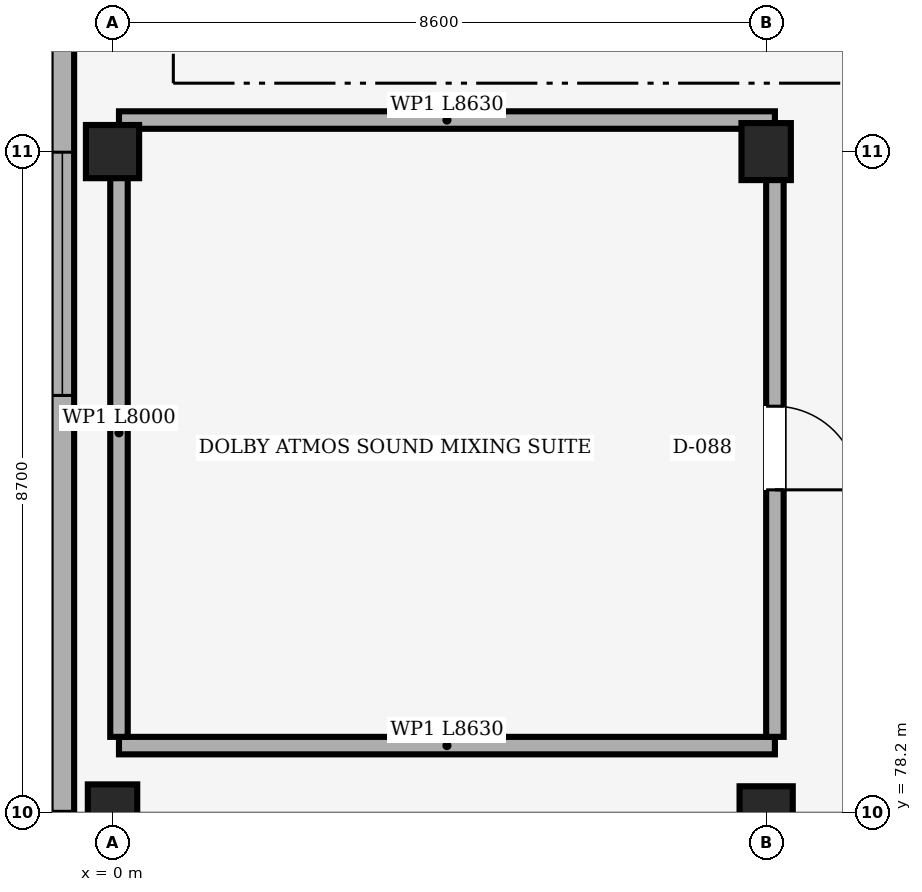
"""IFC4 building model, lengths in metres.
Left out: names, types, materials, properties, quantities, classifications, styles, units other than length and angle.
Written with IfcOpenShell. Run it as: python <this file> out.ifc"""

import sys

from ifc_helpers import new_model, si_unit, direction, frame, frame_2d, origin, origin_2d, place, context, subcontext, project, spatial, rectangle, extrude, element, fill, save


model = new_model("IFC4")
c1 = context("Model", 3, precision=1e-05, world=origin(), true_north=direction((0.0, 1.0)))
c2 = subcontext(c1, "Body", "Model", "MODEL_VIEW")
j1 = project(units=[si_unit("LENGTHUNIT", "METRE"), si_unit("PLANEANGLEUNIT", "RADIAN")], contexts=[c1])
p1 = place(None, origin())
s1 = spatial("IfcSite", under=j1, at=p1, CompositionType="ELEMENT")
p2 = place(p1, origin())
s2 = spatial("IfcBuilding", under=s1, at=p2, CompositionType="ELEMENT")
p3 = place(p2, frame((0.0, 0.0, 8.4)))
s3 = spatial("IfcBuildingStorey", under=s2, at=p3, CompositionType="ELEMENT", Elevation=8.4)
p4 = place(p3, frame((0.0, 78.2, 0.0), z_axis=(0.0, 0.0, 1.0), x_axis=(1.0, 0.0, 0.0)))
e1 = element("IfcColumn", 1, at=p4, inside=s3, PredefinedType="COLUMN", context=c2, shape_type="SweptSolid", body=[
    extrude(rectangle(XDim=0.65, YDim=0.75, at=origin_2d()), origin(), (0.0, 0.0, 1.0), 3.34),
])
for number, where, z_axis, x_axis in (
    (2, (0.0, 86.9, 0.0), (0.0, 0.0, 1.0), (1.0, 0.0, 0.0)),
    (3, (8.6, 78.2, 0.0), (0.0, 0.0, 1.0), (1.0, 0.0, 0.0)),
):
    element("IfcColumn", number, at=place(p3, frame(where, z_axis=z_axis, x_axis=x_axis)), inside=s3, PredefinedType="COLUMN", context=c2, shape_type="SweptSolid", body=[
        extrude(rectangle(XDim=0.7, YDim=0.7, at=origin_2d()), origin(), (0.0, 0.0, 1.0), 3.34),
    ])
p5 = place(p3, frame((8.6, 86.9, 0.0), z_axis=(0.0, 0.0, 1.0), x_axis=(1.0, 0.0, 0.0)))
e4 = element("IfcColumn", 4, at=p5, inside=s3, PredefinedType="COLUMN", context=c2, shape_type="SweptSolid", body=[
    extrude(rectangle(XDim=0.65, YDim=0.75, at=origin_2d()), origin(), (0.0, 0.0, 1.0), 3.34),
])
p6 = place(p3, frame((-0.66, 113.66, 0.0), z_axis=(0.0, 0.0, 1.0), x_axis=(0.0, -1.0, 0.0)))
e5 = element("IfcWall", 5, at=p6, inside=s3, PredefinedType="SOLIDWALL", context=c2, shape_type="SweptSolid", body=[
    extrude(rectangle(XDim=35.46, YDim=0.31, at=frame_2d((17.73, 0.0))), origin(), (0.0, 0.0, 1.0), 3.34),
])
p7 = place(p6, frame((5.492, 0.0, 1.55)))
e6 = element("IfcOpeningElement", 6, at=p7, cuts=e5, PredefinedType="OPENING", context=c2, shape_type="SweptSolid", body=[
    extrude(rectangle(XDim=3.2, YDim=0.7, at=frame_2d((1.6, 0.35))), frame((0.0, 0.155, 0.0), z_axis=(0.0, -1.0, 0.0), x_axis=(1.0, 0.0, 0.0)), (0.0, 0.0, 1.0), 0.31),
])
p8 = place(p6, frame((12.584, 0.0, 1.55)))
e7 = element("IfcOpeningElement", 7, at=p8, cuts=e5, PredefinedType="OPENING", context=c2, shape_type="SweptSolid", body=[
    extrude(rectangle(XDim=3.2, YDim=0.7, at=frame_2d((1.6, 0.35))), frame((0.0, 0.155, 0.0), z_axis=(0.0, -1.0, 0.0), x_axis=(1.0, 0.0, 0.0)), (0.0, 0.0, 1.0), 0.31),
])
p9 = place(p6, frame((19.676, 0.0, 1.55)))
e8 = element("IfcOpeningElement", 8, at=p9, cuts=e5, PredefinedType="OPENING", context=c2, shape_type="SweptSolid", body=[
    extrude(rectangle(XDim=3.2, YDim=0.7, at=frame_2d((1.6, 0.35))), frame((0.0, 0.155, 0.0), z_axis=(0.0, -1.0, 0.0), x_axis=(1.0, 0.0, 0.0)), (0.0, 0.0, 1.0), 0.31),
])
p10 = place(p6, frame((26.768, 0.0, 1.55)))
e9 = element("IfcOpeningElement", 9, at=p10, cuts=e5, PredefinedType="OPENING", context=c2, shape_type="SweptSolid", body=[
    extrude(rectangle(XDim=3.2, YDim=0.7, at=frame_2d((1.6, 0.35))), frame((0.0, 0.155, 0.0), z_axis=(0.0, -1.0, 0.0), x_axis=(1.0, 0.0, 0.0)), (0.0, 0.0, 1.0), 0.31),
])
p11 = place(p3, frame((8.715, 79.085, 0.0), z_axis=(0.0, 0.0, 1.0), x_axis=(-1.0, 0.0, 0.0)))
e10 = element("IfcWall", 10, at=p11, inside=s3, PredefinedType="PARTITIONING", context=c2, shape_type="SweptSolid", body=[
    extrude(rectangle(XDim=8.63, YDim=0.23, at=frame_2d((4.315, 0.0))), origin(), (0.0, 0.0, 1.0), 3.32),
])
p12 = place(p3, frame((0.085, 79.2, 0.0), z_axis=(0.0, 0.0, 1.0), x_axis=(0.0, 1.0, 0.0)))
e11 = element("IfcWall", 11, at=p12, inside=s3, PredefinedType="PARTITIONING", context=c2, shape_type="SweptSolid", body=[
    extrude(rectangle(XDim=8.0, YDim=0.23, at=frame_2d((4.0, 0.0))), origin(), (0.0, 0.0, 1.0), 2.67),
])
p13 = place(p3, frame((0.085, 87.315, 0.0), z_axis=(0.0, 0.0, 1.0), x_axis=(1.0, 0.0, 0.0)))
e12 = element("IfcWall", 12, at=p13, inside=s3, PredefinedType="PARTITIONING", context=c2, shape_type="SweptSolid", body=[
    extrude(rectangle(XDim=8.63, YDim=0.23, at=frame_2d((4.315, 0.0))), origin(), (0.0, 0.0, 1.0), 2.62),
])
p14 = place(p3, frame((8.715, 87.2, 0.0), z_axis=(0.0, 0.0, 1.0), x_axis=(0.0, -1.0, 0.0)))
e13 = element("IfcWall", 13, at=p14, inside=s3, PredefinedType="PARTITIONING", context=c2, shape_type="SweptSolid", body=[
    extrude(rectangle(XDim=8.0, YDim=0.23, at=frame_2d((4.0, 0.0))), origin(), (0.0, 0.0, 1.0), 2.62),
])
p15 = place(p14, frame((3.65, 0.0, 0.0)))
e14 = element("IfcOpeningElement", 14, at=p15, cuts=e13, PredefinedType="OPENING", context=c2, shape_type="SweptSolid", body=[
    extrude(rectangle(XDim=1.1, YDim=2.1, at=frame_2d((0.55, 1.05))), frame((0.0, 0.115, 0.0), z_axis=(0.0, -1.0, 0.0), x_axis=(1.0, 0.0, 0.0)), (0.0, 0.0, 1.0), 0.23),
])
p16 = place(p10, origin())
e15 = element("IfcWindow", 15, at=p16, inside=s3, PartitioningType="SINGLE_PANEL", PredefinedType="WINDOW", context=c2, shape_type="SweptSolid", body=[
    extrude(rectangle(XDim=3.2, YDim=0.7, at=frame_2d((1.6, 0.35))), frame((0.0, -0.06, 0.0), z_axis=(0.0, -1.0, 0.0), x_axis=(1.0, 0.0, 0.0)), (0.0, 0.0, 1.0), 0.06),
])
fill(e9, e15)
p17 = place(p15, origin())
e16 = element("IfcDoor", 16, at=p17, inside=s3, OperationType="SINGLE_SWING_RIGHT", PredefinedType="DOOR", context=c2, shape_type="SweptSolid", body=[
    extrude(rectangle(XDim=1.1, YDim=2.1, at=frame_2d((0.55, 1.05))), frame((0.0, 0.025, 0.0), z_axis=(0.0, -1.0, 0.0), x_axis=(1.0, 0.0, 0.0)), (0.0, 0.0, 1.0), 0.05),
])
fill(e14, e16)
save(model, sys.argv[1])
